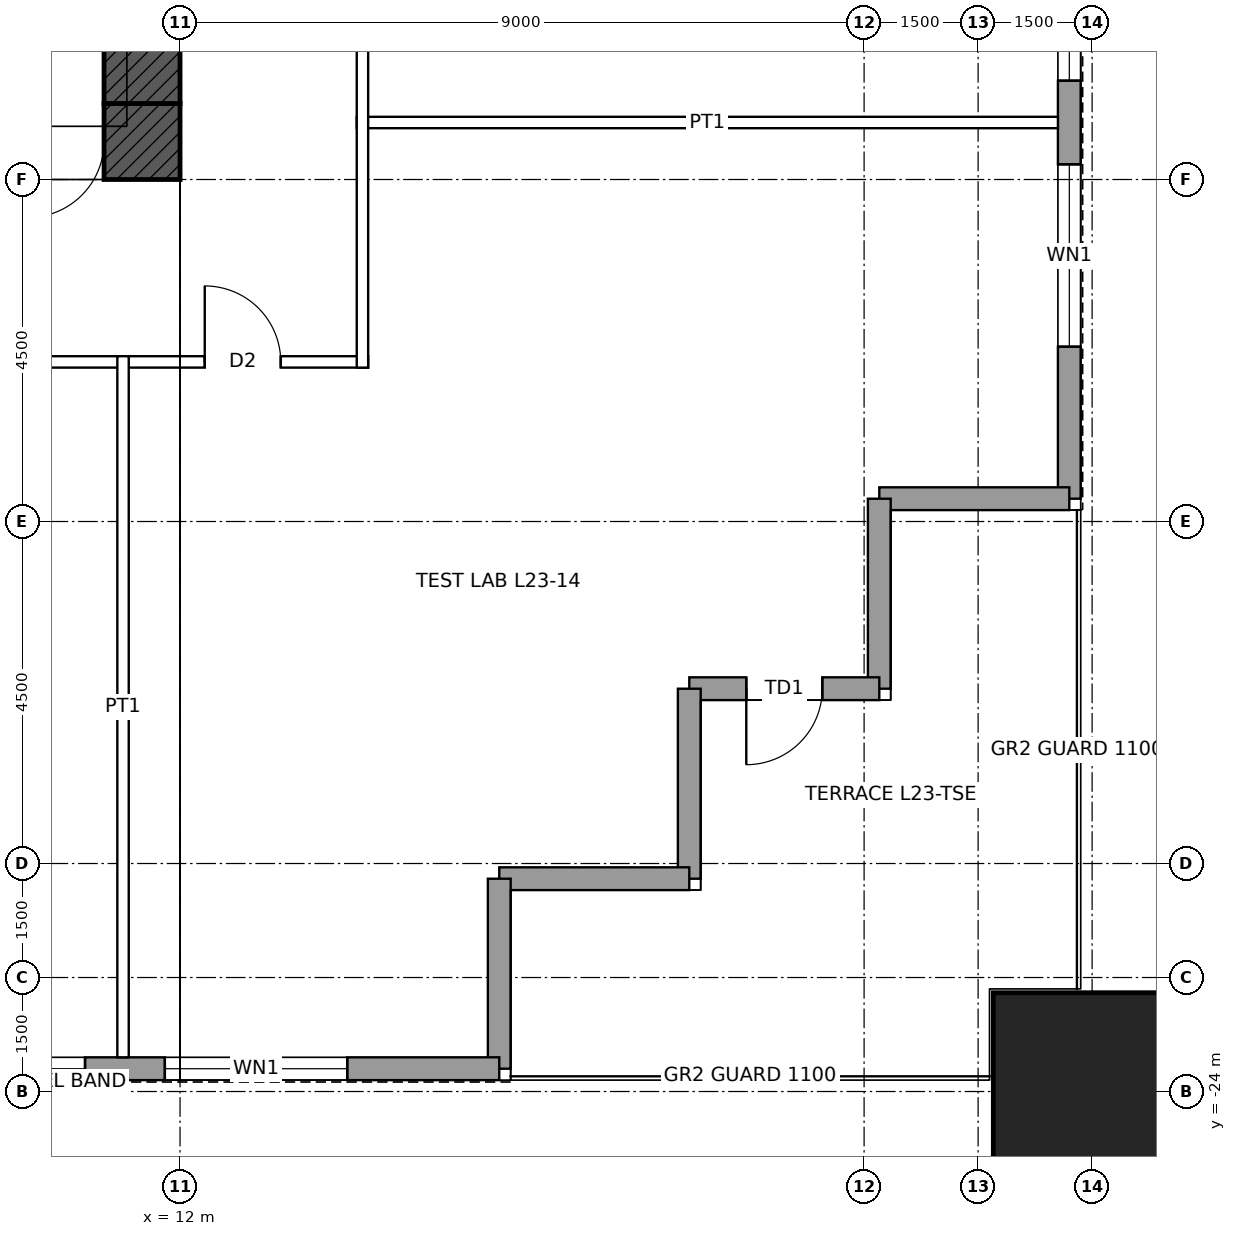
"""IFC4 building model, lengths in metres.
Left out: names, types, materials, properties, quantities, classifications, styles, units other than length and angle.
Written with IfcOpenShell. Run it as: python <this file> out.ifc"""

import sys

from ifc_helpers import new_model, si_unit, direction, frame, frame_2d, origin, origin_2d, place, context, subcontext, project, spatial, rectangle, hollow_rectangle, extrude, element, fill, save


model = new_model("IFC4")
c1 = context("Model", 3, precision=1e-05, world=origin(), true_north=direction((0.0, 1.0)))
c2 = subcontext(c1, "Body", "Model", "MODEL_VIEW")
j1 = project(units=[si_unit("LENGTHUNIT", "METRE"), si_unit("PLANEANGLEUNIT", "RADIAN")], contexts=[c1])
p1 = place(None, origin())
s1 = spatial("IfcSite", under=j1, at=p1, CompositionType="ELEMENT")
p2 = place(p1, origin())
s2 = spatial("IfcBuilding", under=s1, at=p2, CompositionType="ELEMENT")
p3 = place(p2, frame((0.0, 0.0, 117.9)))
s3 = spatial("IfcBuildingStorey", under=s2, at=p3, CompositionType="ELEMENT", Elevation=117.9)
p4 = place(p3, frame((24.0, -24.0, 0.0), z_axis=(0.0, 0.0, 1.0), x_axis=(1.0, 0.0, 0.0)))
e1 = element("IfcColumn", 1, at=p4, inside=s3, PredefinedType="COLUMN", context=c2, shape_type="SweptSolid", body=[
    extrude(hollow_rectangle(XDim=2.6, YDim=2.6, WallThickness=0.13, at=origin_2d()), origin(), (0.0, 0.0, 1.0), 4.5),
])
p5 = place(p3, frame((12.0, -11.5, 0.0), z_axis=(0.0, 0.0, 1.0), x_axis=(-1.0, 0.0, 0.0)))
e2 = element("IfcWall", 2, at=p5, inside=s3, PredefinedType="SHEAR", context=c2, shape_type="SweptSolid", body=[
    extrude(rectangle(XDim=24.0, YDim=1.0, at=frame_2d((12.0, 0.0))), origin(), (0.0, 0.0, 1.0), 4.5),
])
p6 = place(p5, frame((11.5, 0.0, 0.0)))
e3 = element("IfcOpeningElement", 3, at=p6, cuts=e2, PredefinedType="OPENING", context=c2, shape_type="SweptSolid", body=[
    extrude(rectangle(XDim=1.0, YDim=2.1, at=frame_2d((0.5, 1.05))), frame((0.0, 0.51, 0.0), z_axis=(0.0, -1.0, 0.0), x_axis=(1.0, 0.0, 0.0)), (0.0, 0.0, 1.0), 1.02),
])
p7 = place(p5, frame((1.0, 0.0, 0.0)))
e4 = element("IfcOpeningElement", 4, at=p7, cuts=e2, PredefinedType="OPENING", context=c2, shape_type="SweptSolid", body=[
    extrude(rectangle(XDim=1.0, YDim=2.4, at=frame_2d((0.5, 1.2))), frame((0.0, 0.51, 0.0), z_axis=(0.0, -1.0, 0.0), x_axis=(1.0, 0.0, 0.0)), (0.0, 0.0, 1.0), 1.02),
])
p8 = place(p3, frame((11.5, 11.0, 0.0), z_axis=(0.0, 0.0, 1.0), x_axis=(0.0, -1.0, 0.0)))
e5 = element("IfcWall", 5, at=p8, inside=s3, PredefinedType="SHEAR", context=c2, shape_type="SweptSolid", body=[
    extrude(rectangle(XDim=22.0, YDim=1.0, at=frame_2d((11.0, 0.0))), origin(), (0.0, 0.0, 1.0), 4.5),
])
p9 = place(p8, frame((10.5, 0.0, 0.0)))
e6 = element("IfcOpeningElement", 6, at=p9, cuts=e5, PredefinedType="OPENING", context=c2, shape_type="SweptSolid", body=[
    extrude(rectangle(XDim=1.0, YDim=2.4, at=frame_2d((0.5, 1.2))), frame((0.0, 0.51, 0.0), z_axis=(0.0, -1.0, 0.0), x_axis=(1.0, 0.0, 0.0)), (0.0, 0.0, 1.0), 1.02),
])
p10 = place(p3, frame((23.7, 16.2, 0.0), z_axis=(0.0, 0.0, 1.0), x_axis=(0.0, -1.0, 0.0)))
e7 = element("IfcWall", 7, at=p10, inside=s3, PredefinedType="SOLIDWALL", context=c2, shape_type="SweptSolid", body=[
    extrude(rectangle(XDim=32.4, YDim=0.3, at=frame_2d((16.2, 0.0))), origin(), (0.0, 0.0, 1.0), 4.3),
])
p11 = place(p10, frame((2.0, 0.0, 1.0)))
e8 = element("IfcOpeningElement", 8, at=p11, cuts=e7, PredefinedType="OPENING", context=c2, shape_type="SweptSolid", body=[
    extrude(rectangle(XDim=2.4, YDim=1.2, at=frame_2d((1.2, 0.6))), frame((0.0, 0.16, 0.0), z_axis=(0.0, -1.0, 0.0), x_axis=(1.0, 0.0, 0.0)), (0.0, 0.0, 1.0), 0.32),
])
p12 = place(p10, frame((5.5, 0.0, 1.0)))
e9 = element("IfcOpeningElement", 9, at=p12, cuts=e7, PredefinedType="OPENING", context=c2, shape_type="SweptSolid", body=[
    extrude(rectangle(XDim=2.4, YDim=1.2, at=frame_2d((1.2, 0.6))), frame((0.0, 0.16, 0.0), z_axis=(0.0, -1.0, 0.0), x_axis=(1.0, 0.0, 0.0)), (0.0, 0.0, 1.0), 0.32),
])
p13 = place(p10, frame((8.45, 0.0, 1.0)))
e10 = element("IfcOpeningElement", 10, at=p13, cuts=e7, PredefinedType="OPENING", context=c2, shape_type="SweptSolid", body=[
    extrude(rectangle(XDim=1.8, YDim=1.2, at=frame_2d((0.9, 0.6))), frame((0.0, 0.16, 0.0), z_axis=(0.0, -1.0, 0.0), x_axis=(1.0, 0.0, 0.0)), (0.0, 0.0, 1.0), 0.32),
])
p14 = place(p10, frame((10.55, 0.0, 1.0)))
e11 = element("IfcOpeningElement", 11, at=p14, cuts=e7, PredefinedType="OPENING", context=c2, shape_type="SweptSolid", body=[
    extrude(rectangle(XDim=1.8, YDim=1.2, at=frame_2d((0.9, 0.6))), frame((0.0, 0.16, 0.0), z_axis=(0.0, -1.0, 0.0), x_axis=(1.0, 0.0, 0.0)), (0.0, 0.0, 1.0), 0.32),
])
p15 = place(p10, frame((15.6, 0.0, 1.0)))
e12 = element("IfcOpeningElement", 12, at=p15, cuts=e7, PredefinedType="OPENING", context=c2, shape_type="SweptSolid", body=[
    extrude(rectangle(XDim=1.8, YDim=1.2, at=frame_2d((0.9, 0.6))), frame((0.0, 0.16, 0.0), z_axis=(0.0, -1.0, 0.0), x_axis=(1.0, 0.0, 0.0)), (0.0, 0.0, 1.0), 0.32),
])
p16 = place(p10, frame((20.5, 0.0, 1.0)))
e13 = element("IfcOpeningElement", 13, at=p16, cuts=e7, PredefinedType="OPENING", context=c2, shape_type="SweptSolid", body=[
    extrude(rectangle(XDim=2.4, YDim=1.2, at=frame_2d((1.2, 0.6))), frame((0.0, 0.16, 0.0), z_axis=(0.0, -1.0, 0.0), x_axis=(1.0, 0.0, 0.0)), (0.0, 0.0, 1.0), 0.32),
])
p17 = place(p10, frame((24.5, 0.0, 1.0)))
e14 = element("IfcOpeningElement", 14, at=p17, cuts=e7, PredefinedType="OPENING", context=c2, shape_type="SweptSolid", body=[
    extrude(rectangle(XDim=2.4, YDim=1.2, at=frame_2d((1.2, 0.6))), frame((0.0, 0.16, 0.0), z_axis=(0.0, -1.0, 0.0), x_axis=(1.0, 0.0, 0.0)), (0.0, 0.0, 1.0), 0.32),
])
p18 = place(p10, frame((28.0, 0.0, 1.0)))
e15 = element("IfcOpeningElement", 15, at=p18, cuts=e7, PredefinedType="OPENING", context=c2, shape_type="SweptSolid", body=[
    extrude(rectangle(XDim=2.4, YDim=1.2, at=frame_2d((1.2, 0.6))), frame((0.0, 0.16, 0.0), z_axis=(0.0, -1.0, 0.0), x_axis=(1.0, 0.0, 0.0)), (0.0, 0.0, 1.0), 0.32),
])
for number, where, z_axis, x_axis in (
    (16, (23.7, -16.2, 0.0), (0.0, 0.0, 1.0), (-1.0, 0.0, 0.0)),
    (17, (21.2, -16.2, 0.0), (0.0, 0.0, 1.0), (0.0, -1.0, 0.0)),
):
    element("IfcWall", number, at=place(p3, frame(where, z_axis=z_axis, x_axis=x_axis)), inside=s3, PredefinedType="SOLIDWALL", context=c2, shape_type="SweptSolid", body=[
        extrude(rectangle(XDim=2.5, YDim=0.3, at=frame_2d((1.25, 0.0))), origin(), (0.0, 0.0, 1.0), 4.3),
    ])
p19 = place(p3, frame((21.2, -18.7, 0.0), z_axis=(0.0, 0.0, 1.0), x_axis=(-1.0, 0.0, 0.0)))
e18 = element("IfcWall", 18, at=p19, inside=s3, PredefinedType="SOLIDWALL", context=c2, shape_type="SweptSolid", body=[
    extrude(rectangle(XDim=2.5, YDim=0.3, at=frame_2d((1.25, 0.0))), origin(), (0.0, 0.0, 1.0), 4.3),
])
p20 = place(p19, frame((0.75, 0.0, 0.0)))
e19 = element("IfcOpeningElement", 19, at=p20, cuts=e18, PredefinedType="OPENING", context=c2, shape_type="SweptSolid", body=[
    extrude(rectangle(XDim=1.0, YDim=2.4, at=frame_2d((0.5, 1.2))), frame((0.0, 0.16, 0.0), z_axis=(0.0, -1.0, 0.0), x_axis=(1.0, 0.0, 0.0)), (0.0, 0.0, 1.0), 0.32),
])
for number, where, z_axis, x_axis in (
    (20, (18.7, -18.7, 0.0), (0.0, 0.0, 1.0), (0.0, -1.0, 0.0)),
    (21, (18.7, -21.2, 0.0), (0.0, 0.0, 1.0), (-1.0, 0.0, 0.0)),
    (22, (16.2, -21.2, 0.0), (0.0, 0.0, 1.0), (0.0, -1.0, 0.0)),
):
    element("IfcWall", number, at=place(p3, frame(where, z_axis=z_axis, x_axis=x_axis)), inside=s3, PredefinedType="SOLIDWALL", context=c2, shape_type="SweptSolid", body=[
        extrude(rectangle(XDim=2.5, YDim=0.3, at=frame_2d((1.25, 0.0))), origin(), (0.0, 0.0, 1.0), 4.3),
    ])
p21 = place(p3, frame((16.2, -23.7, 0.0), z_axis=(0.0, 0.0, 1.0), x_axis=(-1.0, 0.0, 0.0)))
e23 = element("IfcWall", 23, at=p21, inside=s3, PredefinedType="SOLIDWALL", context=c2, shape_type="SweptSolid", body=[
    extrude(rectangle(XDim=32.4, YDim=0.3, at=frame_2d((16.2, 0.0))), origin(), (0.0, 0.0, 1.0), 4.3),
])
p22 = place(p21, frame((2.0, 0.0, 1.0)))
e24 = element("IfcOpeningElement", 24, at=p22, cuts=e23, PredefinedType="OPENING", context=c2, shape_type="SweptSolid", body=[
    extrude(rectangle(XDim=2.4, YDim=1.2, at=frame_2d((1.2, 0.6))), frame((0.0, 0.16, 0.0), z_axis=(0.0, -1.0, 0.0), x_axis=(1.0, 0.0, 0.0)), (0.0, 0.0, 1.0), 0.32),
])
p23 = place(p21, frame((5.45, 0.0, 1.0)))
e25 = element("IfcOpeningElement", 25, at=p23, cuts=e23, PredefinedType="OPENING", context=c2, shape_type="SweptSolid", body=[
    extrude(rectangle(XDim=2.4, YDim=1.2, at=frame_2d((1.2, 0.6))), frame((0.0, 0.16, 0.0), z_axis=(0.0, -1.0, 0.0), x_axis=(1.0, 0.0, 0.0)), (0.0, 0.0, 1.0), 0.32),
])
p24 = place(p21, frame((8.15, 0.0, 1.0)))
e26 = element("IfcOpeningElement", 26, at=p24, cuts=e23, PredefinedType="OPENING", context=c2, shape_type="SweptSolid", body=[
    extrude(rectangle(XDim=1.8, YDim=1.2, at=frame_2d((0.9, 0.6))), frame((0.0, 0.16, 0.0), z_axis=(0.0, -1.0, 0.0), x_axis=(1.0, 0.0, 0.0)), (0.0, 0.0, 1.0), 0.32),
])
p25 = place(p21, frame((10.25, 0.0, 1.0)))
e27 = element("IfcOpeningElement", 27, at=p25, cuts=e23, PredefinedType="OPENING", context=c2, shape_type="SweptSolid", body=[
    extrude(rectangle(XDim=1.8, YDim=1.2, at=frame_2d((0.9, 0.6))), frame((0.0, 0.16, 0.0), z_axis=(0.0, -1.0, 0.0), x_axis=(1.0, 0.0, 0.0)), (0.0, 0.0, 1.0), 0.32),
])
p26 = place(p21, frame((15.6, 0.0, 1.0)))
e28 = element("IfcOpeningElement", 28, at=p26, cuts=e23, PredefinedType="OPENING", context=c2, shape_type="SweptSolid", body=[
    extrude(rectangle(XDim=1.8, YDim=1.2, at=frame_2d((0.9, 0.6))), frame((0.0, 0.16, 0.0), z_axis=(0.0, -1.0, 0.0), x_axis=(1.0, 0.0, 0.0)), (0.0, 0.0, 1.0), 0.32),
])
p27 = place(p21, frame((20.5, 0.0, 1.0)))
e29 = element("IfcOpeningElement", 29, at=p27, cuts=e23, PredefinedType="OPENING", context=c2, shape_type="SweptSolid", body=[
    extrude(rectangle(XDim=2.4, YDim=1.2, at=frame_2d((1.2, 0.6))), frame((0.0, 0.16, 0.0), z_axis=(0.0, -1.0, 0.0), x_axis=(1.0, 0.0, 0.0)), (0.0, 0.0, 1.0), 0.32),
])
p28 = place(p21, frame((24.5, 0.0, 1.0)))
e30 = element("IfcOpeningElement", 30, at=p28, cuts=e23, PredefinedType="OPENING", context=c2, shape_type="SweptSolid", body=[
    extrude(rectangle(XDim=2.4, YDim=1.2, at=frame_2d((1.2, 0.6))), frame((0.0, 0.16, 0.0), z_axis=(0.0, -1.0, 0.0), x_axis=(1.0, 0.0, 0.0)), (0.0, 0.0, 1.0), 0.32),
])
p29 = place(p21, frame((28.0, 0.0, 1.0)))
e31 = element("IfcOpeningElement", 31, at=p29, cuts=e23, PredefinedType="OPENING", context=c2, shape_type="SweptSolid", body=[
    extrude(rectangle(XDim=2.4, YDim=1.2, at=frame_2d((1.2, 0.6))), frame((0.0, 0.16, 0.0), z_axis=(0.0, -1.0, 0.0), x_axis=(1.0, 0.0, 0.0)), (0.0, 0.0, 1.0), 0.32),
])
p30 = place(p3, frame((-14.475, -14.4, 0.0), z_axis=(0.0, 0.0, 1.0), x_axis=(1.0, 0.0, 0.0)))
e32 = element("IfcWall", 32, at=p30, inside=s3, PredefinedType="PARTITIONING", context=c2, shape_type="SweptSolid", body=[
    extrude(rectangle(XDim=28.95, YDim=0.15, at=frame_2d((14.475, 0.0))), origin(), (0.0, 0.0, 1.0), 4.3),
])
p31 = place(p30, frame((21.075, 0.0, 0.0)))
e33 = element("IfcOpeningElement", 33, at=p31, cuts=e32, PredefinedType="OPENING", context=c2, shape_type="SweptSolid", body=[
    extrude(rectangle(XDim=1.8, YDim=2.4, at=frame_2d((0.9, 1.2))), frame((0.0, 0.085, 0.0), z_axis=(0.0, -1.0, 0.0), x_axis=(1.0, 0.0, 0.0)), (0.0, 0.0, 1.0), 0.17),
])
p32 = place(p30, frame((13.575, 0.0, 0.0)))
e34 = element("IfcOpeningElement", 34, at=p32, cuts=e32, PredefinedType="OPENING", context=c2, shape_type="SweptSolid", body=[
    extrude(rectangle(XDim=1.8, YDim=2.4, at=frame_2d((0.9, 1.2))), frame((0.0, 0.085, 0.0), z_axis=(0.0, -1.0, 0.0), x_axis=(1.0, 0.0, 0.0)), (0.0, 0.0, 1.0), 0.17),
])
p33 = place(p30, frame((6.475, 0.0, 0.0)))
e35 = element("IfcOpeningElement", 35, at=p33, cuts=e32, PredefinedType="OPENING", context=c2, shape_type="SweptSolid", body=[
    extrude(rectangle(XDim=1.0, YDim=2.1, at=frame_2d((0.5, 1.05))), frame((0.0, 0.085, 0.0), z_axis=(0.0, -1.0, 0.0), x_axis=(1.0, 0.0, 0.0)), (0.0, 0.0, 1.0), 0.17),
])
p34 = place(p30, frame((26.8, 0.0, 0.0)))
e36 = element("IfcOpeningElement", 36, at=p34, cuts=e32, PredefinedType="OPENING", context=c2, shape_type="SweptSolid", body=[
    extrude(rectangle(XDim=1.0, YDim=2.1, at=frame_2d((0.5, 1.05))), frame((0.0, 0.085, 0.0), z_axis=(0.0, -1.0, 0.0), x_axis=(1.0, 0.0, 0.0)), (0.0, 0.0, 1.0), 0.17),
])
p35 = place(p30, frame((1.15, 0.0, 0.0)))
e37 = element("IfcOpeningElement", 37, at=p35, cuts=e32, PredefinedType="OPENING", context=c2, shape_type="SweptSolid", body=[
    extrude(rectangle(XDim=1.0, YDim=2.1, at=frame_2d((0.5, 1.05))), frame((0.0, 0.085, 0.0), z_axis=(0.0, -1.0, 0.0), x_axis=(1.0, 0.0, 0.0)), (0.0, 0.0, 1.0), 0.17),
])
for number, where, z_axis, x_axis in (
    (38, (14.325, -11.25, 0.0), (0.0, 0.0, 1.0), (1.0, 0.0, 0.0)),
    (39, (11.25, -23.55, 0.0), (0.0, 0.0, 1.0), (0.0, 1.0, 0.0)),
):
    element("IfcWall", number, at=place(p3, frame(where, z_axis=z_axis, x_axis=x_axis)), inside=s3, PredefinedType="PARTITIONING", context=c2, shape_type="SweptSolid", body=[
        extrude(rectangle(XDim=9.225, YDim=0.15, at=frame_2d((4.613, 0.0))), origin(), (0.0, 0.0, 1.0), 3.431),
    ])
p36 = place(p3, frame((14.4, -14.475, 0.0), z_axis=(0.0, 0.0, 1.0), x_axis=(0.0, 1.0, 0.0)))
e40 = element("IfcWall", 40, at=p36, inside=s3, PredefinedType="PARTITIONING", context=c2, shape_type="SweptSolid", body=[
    extrude(rectangle(XDim=28.95, YDim=0.15, at=frame_2d((14.475, 0.0))), origin(), (0.0, 0.0, 1.0), 4.3),
])
p37 = place(p36, frame((19.2, 0.0, 0.0)))
e41 = element("IfcOpeningElement", 41, at=p37, cuts=e40, PredefinedType="OPENING", context=c2, shape_type="SweptSolid", body=[
    extrude(rectangle(XDim=1.8, YDim=2.4, at=frame_2d((0.9, 1.2))), frame((0.0, 0.085, 0.0), z_axis=(0.0, -1.0, 0.0), x_axis=(1.0, 0.0, 0.0)), (0.0, 0.0, 1.0), 0.17),
])
p38 = place(p36, frame((7.95, 0.0, 0.0)))
e42 = element("IfcOpeningElement", 42, at=p38, cuts=e40, PredefinedType="OPENING", context=c2, shape_type="SweptSolid", body=[
    extrude(rectangle(XDim=1.8, YDim=2.4, at=frame_2d((0.9, 1.2))), frame((0.0, 0.085, 0.0), z_axis=(0.0, -1.0, 0.0), x_axis=(1.0, 0.0, 0.0)), (0.0, 0.0, 1.0), 0.17),
])
p39 = place(p17, origin())
e43 = element("IfcWindow", 43, at=p39, inside=s3, PartitioningType="SINGLE_PANEL", PredefinedType="WINDOW", context=c2, shape_type="SweptSolid", body=[
    extrude(rectangle(XDim=2.4, YDim=1.2, at=frame_2d((1.2, 0.6))), frame((0.0, 0.03, 0.0), z_axis=(0.0, -1.0, 0.0), x_axis=(1.0, 0.0, 0.0)), (0.0, 0.0, 1.0), 0.06),
])
fill(e14, e43)
p40 = place(p18, origin())
e44 = element("IfcWindow", 44, at=p40, inside=s3, PartitioningType="SINGLE_PANEL", PredefinedType="WINDOW", context=c2, shape_type="SweptSolid", body=[
    extrude(rectangle(XDim=2.4, YDim=1.2, at=frame_2d((1.2, 0.6))), frame((0.0, 0.03, 0.0), z_axis=(0.0, -1.0, 0.0), x_axis=(1.0, 0.0, 0.0)), (0.0, 0.0, 1.0), 0.06),
])
fill(e15, e44)
p41 = place(p20, origin())
e45 = element("IfcDoor", 45, at=p41, inside=s3, OperationType="SINGLE_SWING_RIGHT", PredefinedType="DOOR", context=c2, shape_type="SweptSolid", body=[
    extrude(rectangle(XDim=1.0, YDim=2.4, at=frame_2d((0.5, 1.2))), frame((0.0, 0.025, 0.0), z_axis=(0.0, -1.0, 0.0), x_axis=(1.0, 0.0, 0.0)), (0.0, 0.0, 1.0), 0.05),
])
fill(e19, e45)
p42 = place(p22, origin())
e46 = element("IfcWindow", 46, at=p42, inside=s3, PartitioningType="SINGLE_PANEL", PredefinedType="WINDOW", context=c2, shape_type="SweptSolid", body=[
    extrude(rectangle(XDim=2.4, YDim=1.2, at=frame_2d((1.2, 0.6))), frame((0.0, 0.03, 0.0), z_axis=(0.0, -1.0, 0.0), x_axis=(1.0, 0.0, 0.0)), (0.0, 0.0, 1.0), 0.06),
])
fill(e24, e46)
p43 = place(p23, origin())
e47 = element("IfcWindow", 47, at=p43, inside=s3, PartitioningType="SINGLE_PANEL", PredefinedType="WINDOW", context=c2, shape_type="SweptSolid", body=[
    extrude(rectangle(XDim=2.4, YDim=1.2, at=frame_2d((1.2, 0.6))), frame((0.0, 0.03, 0.0), z_axis=(0.0, -1.0, 0.0), x_axis=(1.0, 0.0, 0.0)), (0.0, 0.0, 1.0), 0.06),
])
fill(e25, e47)
p44 = place(p7, origin())
e48 = element("IfcDoor", 48, at=p44, inside=s3, OperationType="SINGLE_SWING_RIGHT", PredefinedType="DOOR", context=c2, shape_type="SweptSolid", body=[
    extrude(rectangle(XDim=1.0, YDim=2.4, at=frame_2d((0.5, 1.2))), frame((0.0, 0.485, 0.0), z_axis=(0.0, -1.0, 0.0), x_axis=(1.0, 0.0, 0.0)), (0.0, 0.0, 1.0), 0.05),
])
fill(e4, e48)
p45 = place(p34, origin())
e49 = element("IfcDoor", 49, at=p45, inside=s3, OperationType="SINGLE_SWING_LEFT", PredefinedType="DOOR", context=c2, shape_type="SweptSolid", body=[
    extrude(rectangle(XDim=1.0, YDim=2.1, at=frame_2d((0.5, 1.05))), frame((0.0, 0.025, 0.0), z_axis=(0.0, -1.0, 0.0), x_axis=(1.0, 0.0, 0.0)), (0.0, 0.0, 1.0), 0.05),
])
fill(e36, e49)
save(model, sys.argv[1])
